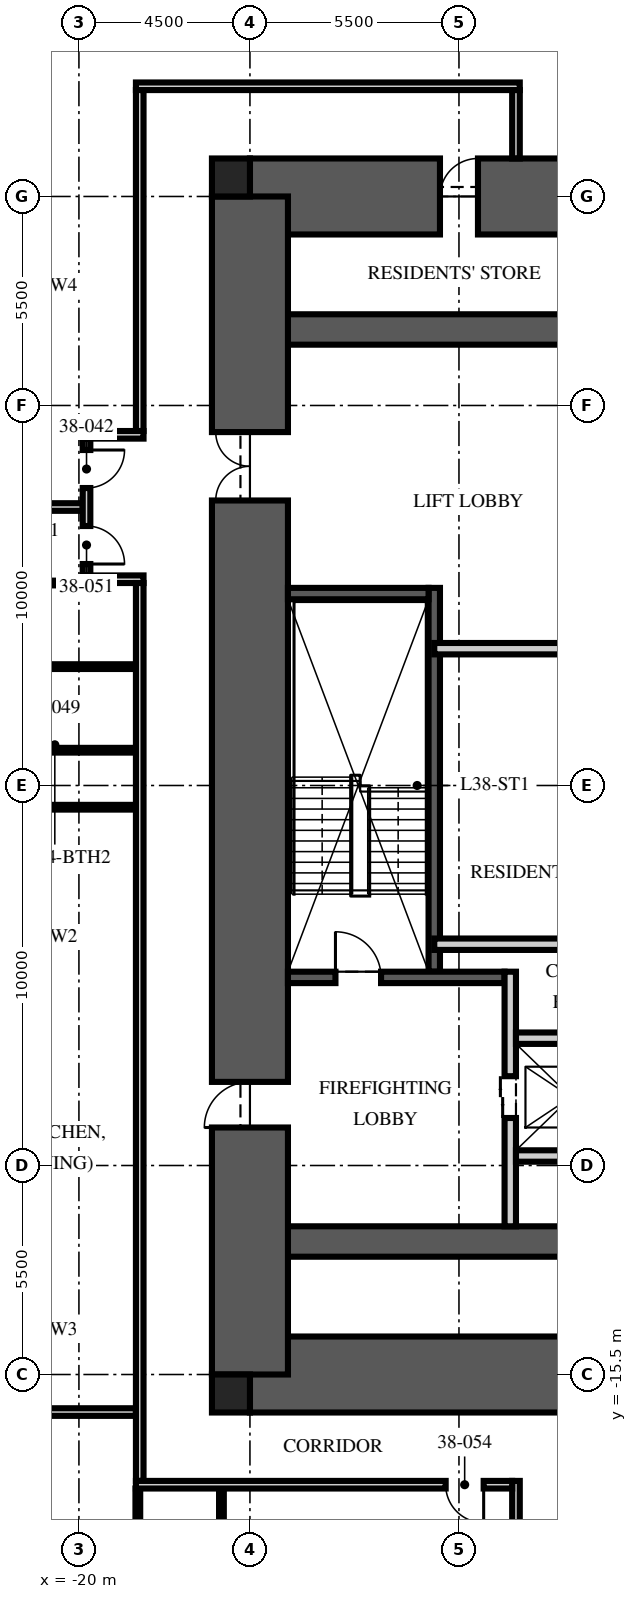
"""IFC4 building model, lengths in metres.
Left out: names, types, materials, properties, quantities, classifications, styles, units other than length and angle.
Written with IfcOpenShell. Run it as: python <this file> out.ifc"""

import sys

from ifc_helpers import new_model, si_unit, direction, frame, frame_2d, origin, origin_2d, place, context, subcontext, project, spatial, rectangle, extrude, element, fill, save


model = new_model("IFC4")
c1 = context("Model", 3, precision=1e-05, world=origin(), true_north=direction((0.0, 1.0)))
c2 = subcontext(c1, "Body", "Model", "MODEL_VIEW")
j1 = project(units=[si_unit("LENGTHUNIT", "METRE"), si_unit("PLANEANGLEUNIT", "RADIAN")], contexts=[c1])
p1 = place(None, origin())
s1 = spatial("IfcSite", under=j1, at=p1, CompositionType="ELEMENT")
p2 = place(p1, origin())
s2 = spatial("IfcBuilding", under=s1, at=p2, CompositionType="ELEMENT")
p3 = place(p2, frame((0.0, 0.0, 152.25)))
s3 = spatial("IfcBuildingStorey", under=s2, at=p3, CompositionType="ELEMENT", Elevation=152.25)
p4 = place(p3, frame((-15.5, 15.5, -0.25), z_axis=(0.0, 0.0, 1.0), x_axis=(1.0, 0.0, 0.0)))
e1 = element("IfcWall", 1, at=p4, inside=s3, PredefinedType="SHEAR", context=c2, shape_type="SweptSolid", body=[
    extrude(rectangle(XDim=31.0, YDim=2.0, at=frame_2d((15.5, 0.0))), origin(), (0.0, 0.0, 1.0), 3.75),
])
p5 = place(p4, frame((5.0, 0.0, 0.25)))
e2 = element("IfcOpeningElement", 2, at=p5, cuts=e1, PredefinedType="OPENING", context=c2, shape_type="SweptSolid", body=[
    extrude(rectangle(XDim=1.0, YDim=2.1, at=frame_2d((0.5, 1.05))), frame((0.0, 1.01, 0.0), z_axis=(0.0, -1.0, 0.0), x_axis=(1.0, 0.0, 0.0)), (0.0, 0.0, 1.0), 2.02),
])
p6 = place(p3, frame((-15.5, -15.5, -0.25), z_axis=(0.0, 0.0, 1.0), x_axis=(1.0, 0.0, 0.0)))
e3 = element("IfcWall", 3, at=p6, inside=s3, PredefinedType="SHEAR", context=c2, shape_type="SweptSolid", body=[
    extrude(rectangle(XDim=31.0, YDim=2.0, at=frame_2d((15.5, 0.0))), origin(), (0.0, 0.0, 1.0), 3.75),
])
p7 = place(p6, frame((10.4, 0.0, 0.25)))
e4 = element("IfcOpeningElement", 4, at=p7, cuts=e3, PredefinedType="OPENING", context=c2, shape_type="SweptSolid", body=[
    extrude(rectangle(XDim=1.1, YDim=2.1, at=frame_2d((0.55, 1.05))), frame((0.0, 1.01, 0.0), z_axis=(0.0, -1.0, 0.0), x_axis=(1.0, 0.0, 0.0)), (0.0, 0.0, 1.0), 2.02),
])
p8 = place(p6, frame((13.5, 0.0, 0.25)))
e5 = element("IfcOpeningElement", 5, at=p8, cuts=e3, PredefinedType="OPENING", context=c2, shape_type="SweptSolid", body=[
    extrude(rectangle(XDim=1.1, YDim=2.1, at=frame_2d((0.55, 1.05))), frame((0.0, 1.01, 0.0), z_axis=(0.0, -1.0, 0.0), x_axis=(1.0, 0.0, 0.0)), (0.0, 0.0, 1.0), 2.02),
])
p9 = place(p6, frame((16.6, 0.0, 0.25)))
e6 = element("IfcOpeningElement", 6, at=p9, cuts=e3, PredefinedType="OPENING", context=c2, shape_type="SweptSolid", body=[
    extrude(rectangle(XDim=1.1, YDim=2.1, at=frame_2d((0.55, 1.05))), frame((0.0, 1.01, 0.0), z_axis=(0.0, -1.0, 0.0), x_axis=(1.0, 0.0, 0.0)), (0.0, 0.0, 1.0), 2.02),
])
for number, where, z_axis, x_axis in (
    (7, (-15.5, 12.0, -0.25), (0.0, 0.0, 1.0), (1.0, 0.0, 0.0)),
    (8, (-15.5, -12.0, -0.25), (0.0, 0.0, 1.0), (1.0, 0.0, 0.0)),
):
    element("IfcWall", number, at=place(p3, frame(where, z_axis=z_axis, x_axis=x_axis)), inside=s3, PredefinedType="SHEAR", context=c2, shape_type="SweptSolid", body=[
        extrude(rectangle(XDim=31.0, YDim=0.8, at=frame_2d((15.5, 0.0))), origin(), (0.0, 0.0, 1.0), 3.75),
    ])
p10 = place(p3, frame((-15.5, -15.5, -0.25), z_axis=(0.0, 0.0, 1.0), x_axis=(0.0, 1.0, 0.0)))
e9 = element("IfcWall", 9, at=p10, inside=s3, PredefinedType="SHEAR", context=c2, shape_type="SweptSolid", body=[
    extrude(rectangle(XDim=31.0, YDim=2.0, at=frame_2d((15.5, 0.0))), origin(), (0.0, 0.0, 1.0), 3.75),
])
p11 = place(p10, frame((6.5, 0.0, 0.25)))
e10 = element("IfcOpeningElement", 10, at=p11, cuts=e9, PredefinedType="OPENING", context=c2, shape_type="SweptSolid", body=[
    extrude(rectangle(XDim=1.2, YDim=2.1, at=frame_2d((0.6, 1.05))), frame((0.0, 1.01, 0.0), z_axis=(0.0, -1.0, 0.0), x_axis=(1.0, 0.0, 0.0)), (0.0, 0.0, 1.0), 2.02),
])
p12 = place(p10, frame((23.0, 0.0, 0.25)))
e11 = element("IfcOpeningElement", 11, at=p12, cuts=e9, PredefinedType="OPENING", context=c2, shape_type="SweptSolid", body=[
    extrude(rectangle(XDim=1.8, YDim=2.1, at=frame_2d((0.9, 1.05))), frame((0.0, 1.01, 0.0), z_axis=(0.0, -1.0, 0.0), x_axis=(1.0, 0.0, 0.0)), (0.0, 0.0, 1.0), 2.02),
])
for number, where, z_axis, x_axis in (
    (12, (-16.0, 16.0, -0.25), (0.0, 0.0, 1.0), (1.0, 0.0, 0.0)),
    (13, (-16.0, -16.0, -0.25), (0.0, 0.0, 1.0), (1.0, 0.0, 0.0)),
):
    element("IfcColumn", number, at=place(p3, frame(where, z_axis=z_axis, x_axis=x_axis)), inside=s3, PredefinedType="COLUMN", context=c2, shape_type="SweptSolid", body=[
        extrude(rectangle(XDim=1.0, YDim=1.0, at=origin_2d()), origin(), (0.0, 0.0, 1.0), 3.75),
    ])
p13 = place(p3, frame((-10.65, -4.9, 0.0), z_axis=(0.0, 0.0, 1.0), x_axis=(0.0, 1.0, 0.0)))
e14 = element("IfcWall", 14, at=p13, inside=s3, PredefinedType="SOLIDWALL", context=c2, shape_type="SweptSolid", body=[
    extrude(rectangle(XDim=10.1, YDim=0.3, at=frame_2d((5.05, 0.0))), origin(), (0.0, 0.0, 1.0), 3.5),
])
p14 = place(p3, frame((-14.5, -5.05, 0.0), z_axis=(0.0, 0.0, 1.0), x_axis=(1.0, 0.0, 0.0)))
e15 = element("IfcWall", 15, at=p14, inside=s3, PredefinedType="SOLIDWALL", context=c2, shape_type="SweptSolid", body=[
    extrude(rectangle(XDim=5.7, YDim=0.3, at=frame_2d((2.85, 0.0))), origin(), (0.0, 0.0, 1.0), 3.5),
])
p15 = place(p14, frame((1.25, 0.0, 0.0)))
e16 = element("IfcOpeningElement", 16, at=p15, cuts=e15, PredefinedType="OPENING", context=c2, shape_type="SweptSolid", body=[
    extrude(rectangle(XDim=1.2, YDim=2.1, at=frame_2d((0.6, 1.05))), frame((0.0, 0.16, 0.0), z_axis=(0.0, -1.0, 0.0), x_axis=(1.0, 0.0, 0.0)), (0.0, 0.0, 1.0), 0.32),
])
p16 = place(p3, frame((-14.5, 5.05, 0.0), z_axis=(0.0, 0.0, 1.0), x_axis=(1.0, 0.0, 0.0)))
e17 = element("IfcWall", 17, at=p16, inside=s3, PredefinedType="SOLIDWALL", context=c2, shape_type="SweptSolid", body=[
    extrude(rectangle(XDim=3.7, YDim=0.3, at=frame_2d((1.85, 0.0))), origin(), (0.0, 0.0, 1.0), 3.5),
])
p17 = place(p3, frame((-8.65, -11.6, 0.0), z_axis=(0.0, 0.0, 1.0), x_axis=(0.0, 1.0, 0.0)))
e18 = element("IfcWall", 18, at=p17, inside=s3, PredefinedType="PARTITIONING", context=c2, shape_type="SweptSolid", body=[
    extrude(rectangle(XDim=6.7, YDim=0.3, at=frame_2d((3.35, 0.0))), origin(), (0.0, 0.0, 1.0), 3.5),
])
p18 = place(p17, frame((2.85, 0.0, 0.0)))
e19 = element("IfcOpeningElement", 19, at=p18, cuts=e18, PredefinedType="OPENING", context=c2, shape_type="SweptSolid", body=[
    extrude(rectangle(XDim=1.1, YDim=2.1, at=frame_2d((0.55, 1.05))), frame((0.0, 0.16, 0.0), z_axis=(0.0, -1.0, 0.0), x_axis=(1.0, 0.0, 0.0)), (0.0, 0.0, 1.0), 0.32),
])
p19 = place(p3, frame((-8.5, -6.65, 0.0), z_axis=(0.0, 0.0, 1.0), x_axis=(1.0, 0.0, 0.0)))
e20 = element("IfcWall", 20, at=p19, inside=s3, PredefinedType="PARTITIONING", context=c2, shape_type="SweptSolid", body=[
    extrude(rectangle(XDim=17.0, YDim=0.3, at=frame_2d((8.5, 0.0))), origin(), (0.0, 0.0, 1.0), 3.5),
])
p20 = place(p19, frame((7.8, 0.0, 0.0)))
e21 = element("IfcOpeningElement", 21, at=p20, cuts=e20, PredefinedType="OPENING", context=c2, shape_type="SweptSolid", body=[
    extrude(rectangle(XDim=1.3, YDim=2.4, at=frame_2d((0.65, 1.2))), frame((0.0, 0.16, 0.0), z_axis=(0.0, -1.0, 0.0), x_axis=(1.0, 0.0, 0.0)), (0.0, 0.0, 1.0), 0.32),
])
p21 = place(p19, frame((5.65, 0.0, 0.0)))
e22 = element("IfcOpeningElement", 22, at=p21, cuts=e20, PredefinedType="OPENING", context=c2, shape_type="SweptSolid", body=[
    extrude(rectangle(XDim=0.9, YDim=2.1, at=frame_2d((0.45, 1.05))), frame((0.0, 0.16, 0.0), z_axis=(0.0, -1.0, 0.0), x_axis=(1.0, 0.0, 0.0)), (0.0, 0.0, 1.0), 0.32),
])
p22 = place(p19, frame((10.4, 0.0, 0.0)))
e23 = element("IfcOpeningElement", 23, at=p22, cuts=e20, PredefinedType="OPENING", context=c2, shape_type="SweptSolid", body=[
    extrude(rectangle(XDim=0.9, YDim=2.1, at=frame_2d((0.45, 1.05))), frame((0.0, 0.16, 0.0), z_axis=(0.0, -1.0, 0.0), x_axis=(1.0, 0.0, 0.0)), (0.0, 0.0, 1.0), 0.32),
])
p23 = place(p3, frame((-8.5, -9.75, 0.0), z_axis=(0.0, 0.0, 1.0), x_axis=(1.0, 0.0, 0.0)))
e24 = element("IfcWall", 24, at=p23, inside=s3, PredefinedType="PARTITIONING", context=c2, shape_type="SweptSolid", body=[
    extrude(rectangle(XDim=2.9, YDim=0.3, at=frame_2d((1.45, 0.0))), origin(), (0.0, 0.0, 1.0), 3.5),
])
p24 = place(p3, frame((-10.65, 3.6, 0.0), z_axis=(0.0, 0.0, 1.0), x_axis=(1.0, 0.0, 0.0)))
e25 = element("IfcWall", 25, at=p24, inside=s3, PredefinedType="PARTITIONING", context=c2, shape_type="SweptSolid", body=[
    extrude(rectangle(XDim=21.3, YDim=0.3, at=frame_2d((10.65, 0.0))), origin(), (0.0, 0.0, 1.0), 3.5),
])
p25 = place(p24, frame((10.05, 0.0, 0.0)))
e26 = element("IfcOpeningElement", 26, at=p25, cuts=e25, PredefinedType="OPENING", context=c2, shape_type="SweptSolid", body=[
    extrude(rectangle(XDim=1.2, YDim=2.1, at=frame_2d((0.6, 1.05))), frame((0.0, 0.16, 0.0), z_axis=(0.0, -1.0, 0.0), x_axis=(1.0, 0.0, 0.0)), (0.0, 0.0, 1.0), 0.32),
])
p26 = place(p24, frame((19.238, 0.0, 0.0)))
e27 = element("IfcOpeningElement", 27, at=p26, cuts=e25, PredefinedType="OPENING", context=c2, shape_type="SweptSolid", body=[
    extrude(rectangle(XDim=0.9, YDim=2.1, at=frame_2d((0.45, 1.05))), frame((0.0, 0.16, 0.0), z_axis=(0.0, -1.0, 0.0), x_axis=(1.0, 0.0, 0.0)), (0.0, 0.0, 1.0), 0.32),
])
p27 = place(p3, frame((-10.65, -4.177, 0.0), z_axis=(0.0, 0.0, 1.0), x_axis=(1.0, 0.0, 0.0)))
e28 = element("IfcWall", 28, at=p27, inside=s3, PredefinedType="PARTITIONING", context=c2, shape_type="SweptSolid", body=[
    extrude(rectangle(XDim=6.45, YDim=0.3, at=frame_2d((3.225, 0.0))), origin(), (0.0, 0.0, 1.0), 3.5),
])
p28 = place(p3, frame((-18.5, 18.4, 0.0), z_axis=(0.0, 0.0, 1.0), x_axis=(1.0, 0.0, 0.0)))
e29 = element("IfcWall", 29, at=p28, inside=s3, PredefinedType="PARTITIONING", context=c2, shape_type="SweptSolid", body=[
    extrude(rectangle(XDim=10.1, YDim=0.2, at=frame_2d((5.05, 0.0))), origin(), (0.0, 0.0, 1.0), 2.3),
])
p29 = place(p3, frame((-8.5, 18.3, 0.0), z_axis=(0.0, 0.0, 1.0), x_axis=(0.0, -1.0, 0.0)))
e30 = element("IfcWall", 30, at=p29, inside=s3, PredefinedType="PARTITIONING", context=c2, shape_type="SweptSolid", body=[
    extrude(rectangle(XDim=1.8, YDim=0.2, at=frame_2d((0.9, 0.0))), origin(), (0.0, 0.0, 1.0), 3.5),
])
p30 = place(p3, frame((-19.9, 7.328, 0.0), z_axis=(0.0, 0.0, 1.0), x_axis=(-1.0, 0.0, 0.0)))
e31 = element("IfcWall", 31, at=p30, inside=s3, PredefinedType="PARTITIONING", context=c2, shape_type="SweptSolid", body=[
    extrude(rectangle(XDim=8.5, YDim=0.2, at=frame_2d((4.25, 0.0))), origin(), (0.0, 0.0, 1.0), 2.81),
])
p31 = place(p3, frame((-18.5, -16.488, 0.0), z_axis=(0.0, 0.0, 1.0), x_axis=(-1.0, 0.0, 0.0)))
e32 = element("IfcWall", 32, at=p31, inside=s3, PredefinedType="PARTITIONING", context=c2, shape_type="SweptSolid", body=[
    extrude(rectangle(XDim=9.9, YDim=0.2, at=frame_2d((4.95, 0.0))), origin(), (0.0, 0.0, 1.0), 2.81),
])
p32 = place(p3, frame((-19.97, 5.328, 0.0), z_axis=(0.0, 0.0, 1.0), x_axis=(-1.0, 0.0, 0.0)))
e33 = element("IfcWall", 33, at=p32, inside=s3, PredefinedType="PARTITIONING", context=c2, shape_type="SweptSolid", body=[
    extrude(rectangle(XDim=2.31, YDim=0.125, at=frame_2d((1.155, 0.0))), origin(), (0.0, 0.0, 1.0), 3.5),
])
for number, where, z_axis, x_axis in (
    (34, (-18.5, 3.128, 0.0), (0.0, 0.0, 1.0), (-1.0, 0.0, 0.0)),
    (35, (-18.5, 0.928, 0.0), (0.0, 0.0, 1.0), (-1.0, 0.0, 0.0)),
    (36, (-18.5, -0.572, 0.0), (0.0, 0.0, 1.0), (-1.0, 0.0, 0.0)),
):
    element("IfcWall", number, at=place(p3, frame(where, z_axis=z_axis, x_axis=x_axis)), inside=s3, PredefinedType="PARTITIONING", context=c2, shape_type="SweptSolid", body=[
        extrude(rectangle(XDim=3.78, YDim=0.125, at=frame_2d((1.89, 0.0))), origin(), (0.0, 0.0, 1.0), 3.5),
    ])
p33 = place(p3, frame((-18.45, -18.5, 0.0), z_axis=(0.0, 0.0, 1.0), x_axis=(0.0, -1.0, 0.0)))
e37 = element("IfcWall", 37, at=p33, inside=s3, PredefinedType="PARTITIONING", context=c2, shape_type="SweptSolid", body=[
    extrude(rectangle(XDim=3.78, YDim=0.125, at=frame_2d((1.89, 0.0))), origin(), (0.0, 0.0, 1.0), 2.3),
])
p34 = place(p3, frame((-16.25, -18.5, 0.0), z_axis=(0.0, 0.0, 1.0), x_axis=(0.0, -1.0, 0.0)))
e38 = element("IfcWall", 38, at=p34, inside=s3, PredefinedType="PARTITIONING", context=c2, shape_type="SweptSolid", body=[
    extrude(rectangle(XDim=3.78, YDim=0.125, at=frame_2d((1.89, 0.0))), origin(), (0.0, 0.0, 1.0), 3.5),
])
p35 = place(p3, frame((-18.4, 18.3, 0.0), z_axis=(0.0, 0.0, 1.0), x_axis=(0.0, -1.0, 0.0)))
e39 = element("IfcWall", 39, at=p35, inside=s3, PredefinedType="PARTITIONING", context=c2, shape_type="SweptSolid", body=[
    extrude(rectangle(XDim=8.972, YDim=0.2, at=frame_2d((4.486, 0.0))), origin(), (0.0, 0.0, 1.0), 2.3),
])
p36 = place(p3, frame((-18.3, 9.228, 0.0), z_axis=(0.0, 0.0, 1.0), x_axis=(-1.0, 0.0, 0.0)))
e40 = element("IfcWall", 40, at=p36, inside=s3, PredefinedType="PARTITIONING", context=c2, shape_type="SweptSolid", body=[
    extrude(rectangle(XDim=1.6, YDim=0.2, at=frame_2d((0.8, 0.0))), origin(), (0.0, 0.0, 1.0), 2.7),
])
p37 = place(p3, frame((-18.3, 5.428, 0.0), z_axis=(0.0, 0.0, 1.0), x_axis=(-1.0, 0.0, 0.0)))
e41 = element("IfcWall", 41, at=p37, inside=s3, PredefinedType="PARTITIONING", context=c2, shape_type="SweptSolid", body=[
    extrude(rectangle(XDim=1.6, YDim=0.2, at=frame_2d((0.8, 0.0))), origin(), (0.0, 0.0, 1.0), 3.5),
])
p38 = place(p3, frame((-19.8, 9.128, 0.0), z_axis=(0.0, 0.0, 1.0), x_axis=(0.0, -1.0, 0.0)))
e42 = element("IfcWall", 42, at=p38, inside=s3, PredefinedType="PARTITIONING", context=c2, shape_type="SweptSolid", body=[
    extrude(rectangle(XDim=3.6, YDim=0.2, at=frame_2d((1.8, 0.0))), origin(), (0.0, 0.0, 1.0), 2.7),
])
p39 = place(p38, frame((0.3, 0.0, 0.0)))
e43 = element("IfcOpeningElement", 43, at=p39, cuts=e42, PredefinedType="OPENING", context=c2, shape_type="SweptSolid", body=[
    extrude(rectangle(XDim=1.0, YDim=2.2, at=frame_2d((0.5, 1.1))), frame((0.0, 0.11, 0.0), z_axis=(0.0, -1.0, 0.0), x_axis=(1.0, 0.0, 0.0)), (0.0, 0.0, 1.0), 0.22),
])
p40 = place(p38, frame((2.3, 0.0, 0.0)))
e44 = element("IfcOpeningElement", 44, at=p40, cuts=e42, PredefinedType="OPENING", context=c2, shape_type="SweptSolid", body=[
    extrude(rectangle(XDim=1.0, YDim=2.2, at=frame_2d((0.5, 1.1))), frame((0.0, 0.11, 0.0), z_axis=(0.0, -1.0, 0.0), x_axis=(1.0, 0.0, 0.0)), (0.0, 0.0, 1.0), 0.22),
])
p41 = place(p3, frame((-18.4, 5.328, 0.0), z_axis=(0.0, 0.0, 1.0), x_axis=(0.0, -1.0, 0.0)))
e45 = element("IfcWall", 45, at=p41, inside=s3, PredefinedType="PARTITIONING", context=c2, shape_type="SweptSolid", body=[
    extrude(rectangle(XDim=23.628, YDim=0.2, at=frame_2d((11.814, 0.0))), origin(), (0.0, 0.0, 1.0), 2.3),
])
p42 = place(p3, frame((-8.5, -18.3, 0.0), z_axis=(0.0, 0.0, 1.0), x_axis=(0.0, -1.0, 0.0)))
e46 = element("IfcWall", 46, at=p42, inside=s3, PredefinedType="PARTITIONING", context=c2, shape_type="SweptSolid", body=[
    extrude(rectangle(XDim=3.0, YDim=0.2, at=frame_2d((1.5, 0.0))), origin(), (0.0, 0.0, 1.0), 3.5),
])
p43 = place(p3, frame((-8.6, -18.4, 0.0), z_axis=(0.0, 0.0, 1.0), x_axis=(-1.0, 0.0, 0.0)))
e47 = element("IfcWall", 47, at=p43, inside=s3, PredefinedType="PARTITIONING", context=c2, shape_type="SweptSolid", body=[
    extrude(rectangle(XDim=9.9, YDim=0.2, at=frame_2d((4.95, 0.0))), origin(), (0.0, 0.0, 1.0), 2.3),
])
p44 = place(p43, frame((0.75, 0.0, 0.0)))
e48 = element("IfcOpeningElement", 48, at=p44, cuts=e47, PredefinedType="OPENING", context=c2, shape_type="SweptSolid", body=[
    extrude(rectangle(XDim=1.0, YDim=2.2, at=frame_2d((0.5, 1.1))), frame((0.0, 0.11, 0.0), z_axis=(0.0, -1.0, 0.0), x_axis=(1.0, 0.0, 0.0)), (0.0, 0.0, 1.0), 0.22),
])
p45 = place(p15, origin())
e49 = element("IfcDoor", 49, at=p45, inside=s3, OperationType="SINGLE_SWING_LEFT", PredefinedType="DOOR", context=c2, shape_type="SweptSolid", body=[
    extrude(rectangle(XDim=1.2, YDim=2.1, at=frame_2d((0.6, 1.05))), frame((0.0, 0.025, 0.0), z_axis=(0.0, -1.0, 0.0), x_axis=(1.0, 0.0, 0.0)), (0.0, 0.0, 1.0), 0.05),
])
fill(e16, e49)
p46 = place(p11, origin())
e50 = element("IfcDoor", 50, at=p46, inside=s3, OperationType="SINGLE_SWING_LEFT", PredefinedType="DOOR", context=c2, shape_type="SweptSolid", body=[
    extrude(rectangle(XDim=1.2, YDim=2.1, at=frame_2d((0.6, 1.05))), frame((0.0, 0.025, 0.0), z_axis=(0.0, -1.0, 0.0), x_axis=(1.0, 0.0, 0.0)), (0.0, 0.0, 1.0), 0.05),
])
fill(e10, e50)
p47 = place(p12, origin())
e51 = element("IfcDoor", 51, at=p47, inside=s3, OperationType="DOUBLE_DOOR_SINGLE_SWING", PredefinedType="DOOR", context=c2, shape_type="SweptSolid", body=[
    extrude(rectangle(XDim=1.8, YDim=2.1, at=frame_2d((0.9, 1.05))), frame((0.0, 0.025, 0.0), z_axis=(0.0, -1.0, 0.0), x_axis=(1.0, 0.0, 0.0)), (0.0, 0.0, 1.0), 0.05),
])
fill(e11, e51)
p48 = place(p18, origin())
e52 = element("IfcDoor", 52, at=p48, inside=s3, OperationType="DOUBLE_DOOR_SLIDING", PredefinedType="DOOR", context=c2, shape_type="SweptSolid", body=[
    extrude(rectangle(XDim=1.1, YDim=2.1, at=frame_2d((0.55, 1.05))), frame((0.0, 0.025, 0.0), z_axis=(0.0, -1.0, 0.0), x_axis=(1.0, 0.0, 0.0)), (0.0, 0.0, 1.0), 0.05),
])
fill(e19, e52)
p49 = place(p5, origin())
e53 = element("IfcDoor", 53, at=p49, inside=s3, OperationType="SINGLE_SWING_RIGHT", PredefinedType="DOOR", context=c2, shape_type="SweptSolid", body=[
    extrude(rectangle(XDim=1.0, YDim=2.1, at=frame_2d((0.5, 1.05))), frame((0.0, 0.025, 0.0), z_axis=(0.0, -1.0, 0.0), x_axis=(1.0, 0.0, 0.0)), (0.0, 0.0, 1.0), 0.05),
])
fill(e2, e53)
p50 = place(p39, origin())
e54 = element("IfcDoor", 54, at=p50, inside=s3, OperationType="SINGLE_SWING_LEFT", PredefinedType="DOOR", context=c2, shape_type="SweptSolid", body=[
    extrude(rectangle(XDim=1.0, YDim=2.2, at=frame_2d((0.5, 1.1))), frame((0.0, 0.025, 0.0), z_axis=(0.0, -1.0, 0.0), x_axis=(1.0, 0.0, 0.0)), (0.0, 0.0, 1.0), 0.05),
])
fill(e43, e54)
p51 = place(p40, origin())
e55 = element("IfcDoor", 55, at=p51, inside=s3, OperationType="SINGLE_SWING_RIGHT", PredefinedType="DOOR", context=c2, shape_type="SweptSolid", body=[
    extrude(rectangle(XDim=1.0, YDim=2.2, at=frame_2d((0.5, 1.1))), frame((0.0, 0.025, 0.0), z_axis=(0.0, -1.0, 0.0), x_axis=(1.0, 0.0, 0.0)), (0.0, 0.0, 1.0), 0.05),
])
fill(e44, e55)
p52 = place(p44, origin())
e56 = element("IfcDoor", 56, at=p52, inside=s3, OperationType="SINGLE_SWING_LEFT", PredefinedType="DOOR", context=c2, shape_type="SweptSolid", body=[
    extrude(rectangle(XDim=1.0, YDim=2.2, at=frame_2d((0.5, 1.1))), frame((0.0, 0.025, 0.0), z_axis=(0.0, -1.0, 0.0), x_axis=(1.0, 0.0, 0.0)), (0.0, 0.0, 1.0), 0.05),
])
fill(e48, e56)
save(model, sys.argv[1])
